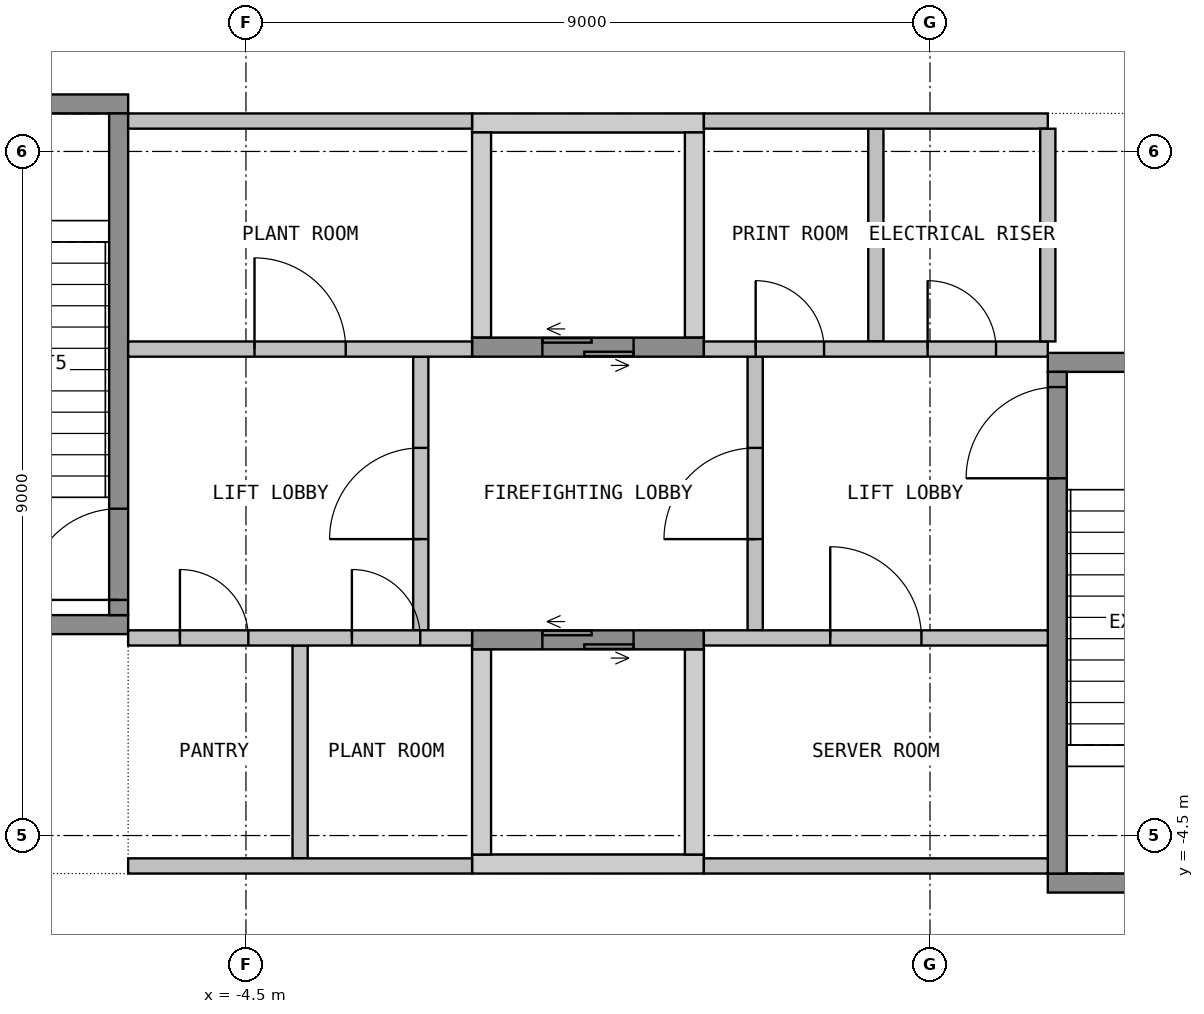
"""IFC4 building model, lengths in metres.
Left out: names, types, materials, properties, quantities, classifications, styles, units other than length and angle.
Written with IfcOpenShell. Run it as: python <this file> out.ifc"""

import sys

from ifc_helpers import new_model, si_unit, direction, frame, frame_2d, origin, place, context, subcontext, project, spatial, polyline, rectangle, outline, extrude, element, fill, save


model = new_model("IFC4")
c1 = context("Model", 3, precision=1e-05, world=origin(), true_north=direction((0.0, 1.0)))
c2 = subcontext(c1, "Body", "Model", "MODEL_VIEW")
j1 = project(units=[si_unit("LENGTHUNIT", "METRE"), si_unit("PLANEANGLEUNIT", "RADIAN")], contexts=[c1])
p1 = place(None, origin())
s1 = spatial("IfcSite", under=j1, at=p1, CompositionType="ELEMENT")
p2 = place(p1, origin())
s2 = spatial("IfcBuilding", under=s1, at=p2, CompositionType="ELEMENT")
p3 = place(p2, frame((0.0, 0.0, 318.9)))
s3 = spatial("IfcBuildingStorey", under=s2, at=p3, CompositionType="ELEMENT", Elevation=318.9)
p4 = place(p3, origin())
e1 = element("IfcWall", 1, at=p4, inside=s3, PredefinedType="SHEAR", context=c2, shape_type="SweptSolid", body=[
    extrude(outline(polyline([(-1.525, 4.75), (1.525, 4.75), (1.525, 5.0), (-1.525, 5.0), (-1.525, 4.75)])), origin(), (0.0, 0.0, 1.0), 3.6),
])
p5 = place(p3, origin())
e2 = element("IfcWall", 2, at=p5, inside=s3, PredefinedType="SHEAR", context=c2, shape_type="SweptSolid", body=[
    extrude(outline(polyline([(-1.525, 2.05), (-1.275, 2.05), (-1.275, 4.75), (-1.525, 4.75), (-1.525, 2.05)])), origin(), (0.0, 0.0, 1.0), 3.6),
])
p6 = place(p3, origin())
e3 = element("IfcWall", 3, at=p6, inside=s3, PredefinedType="SHEAR", context=c2, shape_type="SweptSolid", body=[
    extrude(outline(polyline([(1.275, 2.05), (1.525, 2.05), (1.525, 4.75), (1.275, 4.75), (1.275, 2.05)])), origin(), (0.0, 0.0, 1.0), 3.6),
])
p7 = place(p3, frame((-1.525, 1.925, 0.0), z_axis=(0.0, 0.0, 1.0), x_axis=(1.0, 0.0, 0.0)))
e4 = element("IfcWall", 4, at=p7, inside=s3, PredefinedType="SHEAR", context=c2, shape_type="SweptSolid", body=[
    extrude(rectangle(XDim=3.05, YDim=0.25, at=frame_2d((1.525, 0.0))), origin(), (0.0, 0.0, 1.0), 3.6),
])
p8 = place(p7, frame((0.925, 0.0, 0.0)))
e5 = element("IfcOpeningElement", 5, at=p8, cuts=e4, PredefinedType="OPENING", context=c2, shape_type="SweptSolid", body=[
    extrude(rectangle(XDim=1.2, YDim=2.1, at=frame_2d((0.6, 1.05))), frame((0.0, 0.135, 0.0), z_axis=(0.0, -1.0, 0.0), x_axis=(1.0, 0.0, 0.0)), (0.0, 0.0, 1.0), 0.27),
])
p9 = place(p3, origin())
e6 = element("IfcWall", 6, at=p9, inside=s3, PredefinedType="SHEAR", context=c2, shape_type="SweptSolid", body=[
    extrude(outline(polyline([(-1.525, -5.0), (1.525, -5.0), (1.525, -4.75), (-1.525, -4.75), (-1.525, -5.0)])), origin(), (0.0, 0.0, 1.0), 3.6),
])
p10 = place(p3, origin())
e7 = element("IfcWall", 7, at=p10, inside=s3, PredefinedType="SHEAR", context=c2, shape_type="SweptSolid", body=[
    extrude(outline(polyline([(-1.525, -4.75), (-1.275, -4.75), (-1.275, -2.05), (-1.525, -2.05), (-1.525, -4.75)])), origin(), (0.0, 0.0, 1.0), 3.6),
])
p11 = place(p3, origin())
e8 = element("IfcWall", 8, at=p11, inside=s3, PredefinedType="SHEAR", context=c2, shape_type="SweptSolid", body=[
    extrude(outline(polyline([(1.275, -4.75), (1.525, -4.75), (1.525, -2.05), (1.275, -2.05), (1.275, -4.75)])), origin(), (0.0, 0.0, 1.0), 3.6),
])
p12 = place(p3, frame((-1.525, -1.925, 0.0), z_axis=(0.0, 0.0, 1.0), x_axis=(1.0, 0.0, 0.0)))
e9 = element("IfcWall", 9, at=p12, inside=s3, PredefinedType="SHEAR", context=c2, shape_type="SweptSolid", body=[
    extrude(rectangle(XDim=3.05, YDim=0.25, at=frame_2d((1.525, 0.0))), origin(), (0.0, 0.0, 1.0), 3.6),
])
p13 = place(p12, frame((0.925, 0.0, 0.0)))
e10 = element("IfcOpeningElement", 10, at=p13, cuts=e9, PredefinedType="OPENING", context=c2, shape_type="SweptSolid", body=[
    extrude(rectangle(XDim=1.2, YDim=2.1, at=frame_2d((0.6, 1.05))), frame((0.0, 0.135, 0.0), z_axis=(0.0, -1.0, 0.0), x_axis=(1.0, 0.0, 0.0)), (0.0, 0.0, 1.0), 0.27),
])
p14 = place(p3, frame((-2.2, -1.8, 0.0), z_axis=(0.0, 0.0, 1.0), x_axis=(0.0, 1.0, 0.0)))
e11 = element("IfcWall", 11, at=p14, inside=s3, PredefinedType="PARTITIONING", context=c2, shape_type="SweptSolid", body=[
    extrude(rectangle(XDim=3.6, YDim=0.2, at=frame_2d((1.8, 0.0))), origin(), (0.0, 0.0, 1.0), 3.6),
])
p15 = place(p14, frame((1.2, 0.0, 0.0)))
e12 = element("IfcOpeningElement", 12, at=p15, cuts=e11, PredefinedType="OPENING", context=c2, shape_type="SweptSolid", body=[
    extrude(rectangle(XDim=1.2, YDim=2.1, at=frame_2d((0.6, 1.05))), frame((0.0, 0.11, 0.0), z_axis=(0.0, -1.0, 0.0), x_axis=(1.0, 0.0, 0.0)), (0.0, 0.0, 1.0), 0.22),
])
p16 = place(p3, frame((2.2, -1.8, 0.0), z_axis=(0.0, 0.0, 1.0), x_axis=(0.0, 1.0, 0.0)))
e13 = element("IfcWall", 13, at=p16, inside=s3, PredefinedType="PARTITIONING", context=c2, shape_type="SweptSolid", body=[
    extrude(rectangle(XDim=3.6, YDim=0.2, at=frame_2d((1.8, 0.0))), origin(), (0.0, 0.0, 1.0), 3.6),
])
p17 = place(p16, frame((1.2, 0.0, 0.0)))
e14 = element("IfcOpeningElement", 14, at=p17, cuts=e13, PredefinedType="OPENING", context=c2, shape_type="SweptSolid", body=[
    extrude(rectangle(XDim=1.2, YDim=2.1, at=frame_2d((0.6, 1.05))), frame((0.0, 0.11, 0.0), z_axis=(0.0, -1.0, 0.0), x_axis=(1.0, 0.0, 0.0)), (0.0, 0.0, 1.0), 0.22),
])
for number, where, z_axis, x_axis in (
    (15, (-9.8, -1.725, 0.0), (0.0, 0.0, 1.0), (1.0, 0.0, 0.0)),
    (16, (-9.8, 5.125, 0.0), (0.0, 0.0, 1.0), (1.0, 0.0, 0.0)),
):
    element("IfcWall", number, at=place(p3, frame(where, z_axis=z_axis, x_axis=x_axis)), inside=s3, PredefinedType="SHEAR", context=c2, shape_type="SweptSolid", body=[
        extrude(rectangle(XDim=3.75, YDim=0.25, at=frame_2d((1.875, 0.0))), origin(), (0.0, 0.0, 1.0), 3.6),
    ])
p18 = place(p3, frame((-6.175, -1.6, 0.0), z_axis=(0.0, 0.0, 1.0), x_axis=(0.0, 1.0, 0.0)))
e17 = element("IfcWall", 17, at=p18, inside=s3, PredefinedType="SHEAR", context=c2, shape_type="SweptSolid", body=[
    extrude(rectangle(XDim=6.6, YDim=0.25, at=frame_2d((3.3, 0.0))), origin(), (0.0, 0.0, 1.0), 3.6),
])
p19 = place(p18, frame((0.2, 0.0, 0.0)))
e18 = element("IfcOpeningElement", 18, at=p19, cuts=e17, PredefinedType="OPENING", context=c2, shape_type="SweptSolid", body=[
    extrude(rectangle(XDim=1.2, YDim=2.1, at=frame_2d((0.6, 1.05))), frame((0.0, 0.135, 0.0), z_axis=(0.0, -1.0, 0.0), x_axis=(1.0, 0.0, 0.0)), (0.0, 0.0, 1.0), 0.27),
])
for number, where, z_axis, x_axis in (
    (19, (6.05, -5.125, 0.0), (0.0, 0.0, 1.0), (1.0, 0.0, 0.0)),
    (20, (6.05, 1.725, 0.0), (0.0, 0.0, 1.0), (1.0, 0.0, 0.0)),
):
    element("IfcWall", number, at=place(p3, frame(where, z_axis=z_axis, x_axis=x_axis)), inside=s3, PredefinedType="SHEAR", context=c2, shape_type="SweptSolid", body=[
        extrude(rectangle(XDim=3.75, YDim=0.25, at=frame_2d((1.875, 0.0))), origin(), (0.0, 0.0, 1.0), 3.6),
    ])
p20 = place(p3, frame((6.175, -5.0, 0.0), z_axis=(0.0, 0.0, 1.0), x_axis=(0.0, 1.0, 0.0)))
e21 = element("IfcWall", 21, at=p20, inside=s3, PredefinedType="SHEAR", context=c2, shape_type="SweptSolid", body=[
    extrude(rectangle(XDim=6.6, YDim=0.25, at=frame_2d((3.3, 0.0))), origin(), (0.0, 0.0, 1.0), 3.6),
])
p21 = place(p20, frame((5.2, 0.0, 0.0)))
e22 = element("IfcOpeningElement", 22, at=p21, cuts=e21, PredefinedType="OPENING", context=c2, shape_type="SweptSolid", body=[
    extrude(rectangle(XDim=1.2, YDim=2.1, at=frame_2d((0.6, 1.05))), frame((0.0, 0.135, 0.0), z_axis=(0.0, -1.0, 0.0), x_axis=(1.0, 0.0, 0.0)), (0.0, 0.0, 1.0), 0.27),
])
p22 = place(p3, frame((-6.05, 1.9, 0.0), z_axis=(0.0, 0.0, 1.0), x_axis=(1.0, 0.0, 0.0)))
e23 = element("IfcWall", 23, at=p22, inside=s3, PredefinedType="PARTITIONING", context=c2, shape_type="SweptSolid", body=[
    extrude(rectangle(XDim=4.525, YDim=0.2, at=frame_2d((2.263, 0.0))), origin(), (0.0, 0.0, 1.0), 3.6),
])
p23 = place(p22, frame((1.663, 0.0, 0.0)))
e24 = element("IfcOpeningElement", 24, at=p23, cuts=e23, PredefinedType="OPENING", context=c2, shape_type="SweptSolid", body=[
    extrude(rectangle(XDim=1.2, YDim=2.1, at=frame_2d((0.6, 1.05))), frame((0.0, 0.11, 0.0), z_axis=(0.0, -1.0, 0.0), x_axis=(1.0, 0.0, 0.0)), (0.0, 0.0, 1.0), 0.22),
])
p24 = place(p3, frame((-6.05, 4.9, 0.0), z_axis=(0.0, 0.0, 1.0), x_axis=(1.0, 0.0, 0.0)))
e25 = element("IfcWall", 25, at=p24, inside=s3, PredefinedType="PARTITIONING", context=c2, shape_type="SweptSolid", body=[
    extrude(rectangle(XDim=4.525, YDim=0.2, at=frame_2d((2.263, 0.0))), origin(), (0.0, 0.0, 1.0), 3.6),
])
p25 = place(p3, frame((3.788, 2.0, 0.0), z_axis=(0.0, 0.0, 1.0), x_axis=(0.0, 1.0, 0.0)))
e26 = element("IfcWall", 26, at=p25, inside=s3, PredefinedType="PARTITIONING", context=c2, shape_type="SweptSolid", body=[
    extrude(rectangle(XDim=2.8, YDim=0.2, at=frame_2d((1.4, 0.0))), origin(), (0.0, 0.0, 1.0), 3.6),
])
p26 = place(p3, frame((1.525, 1.9, 0.0), z_axis=(0.0, 0.0, 1.0), x_axis=(1.0, 0.0, 0.0)))
e27 = element("IfcWall", 27, at=p26, inside=s3, PredefinedType="PARTITIONING", context=c2, shape_type="SweptSolid", body=[
    extrude(rectangle(XDim=4.525, YDim=0.2, at=frame_2d((2.263, 0.0))), origin(), (0.0, 0.0, 1.0), 3.6),
])
p27 = place(p26, frame((0.681, 0.0, 0.0)))
e28 = element("IfcOpeningElement", 28, at=p27, cuts=e27, PredefinedType="OPENING", context=c2, shape_type="SweptSolid", body=[
    extrude(rectangle(XDim=0.9, YDim=2.1, at=frame_2d((0.45, 1.05))), frame((0.0, 0.11, 0.0), z_axis=(0.0, -1.0, 0.0), x_axis=(1.0, 0.0, 0.0)), (0.0, 0.0, 1.0), 0.22),
])
p28 = place(p26, frame((2.944, 0.0, 0.0)))
e29 = element("IfcOpeningElement", 29, at=p28, cuts=e27, PredefinedType="OPENING", context=c2, shape_type="SweptSolid", body=[
    extrude(rectangle(XDim=0.9, YDim=2.1, at=frame_2d((0.45, 1.05))), frame((0.0, 0.11, 0.0), z_axis=(0.0, -1.0, 0.0), x_axis=(1.0, 0.0, 0.0)), (0.0, 0.0, 1.0), 0.22),
])
p29 = place(p3, frame((1.525, 4.9, 0.0), z_axis=(0.0, 0.0, 1.0), x_axis=(1.0, 0.0, 0.0)))
e30 = element("IfcWall", 30, at=p29, inside=s3, PredefinedType="PARTITIONING", context=c2, shape_type="SweptSolid", body=[
    extrude(rectangle(XDim=4.525, YDim=0.2, at=frame_2d((2.263, 0.0))), origin(), (0.0, 0.0, 1.0), 3.6),
])
p30 = place(p3, frame((-3.788, -4.8, 0.0), z_axis=(0.0, 0.0, 1.0), x_axis=(0.0, 1.0, 0.0)))
e31 = element("IfcWall", 31, at=p30, inside=s3, PredefinedType="PARTITIONING", context=c2, shape_type="SweptSolid", body=[
    extrude(rectangle(XDim=2.8, YDim=0.2, at=frame_2d((1.4, 0.0))), origin(), (0.0, 0.0, 1.0), 3.6),
])
p31 = place(p3, frame((-6.05, -1.9, 0.0), z_axis=(0.0, 0.0, 1.0), x_axis=(1.0, 0.0, 0.0)))
e32 = element("IfcWall", 32, at=p31, inside=s3, PredefinedType="PARTITIONING", context=c2, shape_type="SweptSolid", body=[
    extrude(rectangle(XDim=4.525, YDim=0.2, at=frame_2d((2.263, 0.0))), origin(), (0.0, 0.0, 1.0), 3.6),
])
p32 = place(p31, frame((0.681, 0.0, 0.0)))
e33 = element("IfcOpeningElement", 33, at=p32, cuts=e32, PredefinedType="OPENING", context=c2, shape_type="SweptSolid", body=[
    extrude(rectangle(XDim=0.9, YDim=2.1, at=frame_2d((0.45, 1.05))), frame((0.0, 0.11, 0.0), z_axis=(0.0, -1.0, 0.0), x_axis=(1.0, 0.0, 0.0)), (0.0, 0.0, 1.0), 0.22),
])
p33 = place(p31, frame((2.944, 0.0, 0.0)))
e34 = element("IfcOpeningElement", 34, at=p33, cuts=e32, PredefinedType="OPENING", context=c2, shape_type="SweptSolid", body=[
    extrude(rectangle(XDim=0.9, YDim=2.1, at=frame_2d((0.45, 1.05))), frame((0.0, 0.11, 0.0), z_axis=(0.0, -1.0, 0.0), x_axis=(1.0, 0.0, 0.0)), (0.0, 0.0, 1.0), 0.22),
])
p34 = place(p3, frame((-6.05, -4.9, 0.0), z_axis=(0.0, 0.0, 1.0), x_axis=(1.0, 0.0, 0.0)))
e35 = element("IfcWall", 35, at=p34, inside=s3, PredefinedType="PARTITIONING", context=c2, shape_type="SweptSolid", body=[
    extrude(rectangle(XDim=4.525, YDim=0.2, at=frame_2d((2.263, 0.0))), origin(), (0.0, 0.0, 1.0), 3.6),
])
p35 = place(p3, frame((1.525, -1.9, 0.0), z_axis=(0.0, 0.0, 1.0), x_axis=(1.0, 0.0, 0.0)))
e36 = element("IfcWall", 36, at=p35, inside=s3, PredefinedType="PARTITIONING", context=c2, shape_type="SweptSolid", body=[
    extrude(rectangle(XDim=4.525, YDim=0.2, at=frame_2d((2.263, 0.0))), origin(), (0.0, 0.0, 1.0), 3.6),
])
p36 = place(p35, frame((1.663, 0.0, 0.0)))
e37 = element("IfcOpeningElement", 37, at=p36, cuts=e36, PredefinedType="OPENING", context=c2, shape_type="SweptSolid", body=[
    extrude(rectangle(XDim=1.2, YDim=2.1, at=frame_2d((0.6, 1.05))), frame((0.0, 0.11, 0.0), z_axis=(0.0, -1.0, 0.0), x_axis=(1.0, 0.0, 0.0)), (0.0, 0.0, 1.0), 0.22),
])
p37 = place(p3, frame((1.525, -4.9, 0.0), z_axis=(0.0, 0.0, 1.0), x_axis=(1.0, 0.0, 0.0)))
e38 = element("IfcWall", 38, at=p37, inside=s3, PredefinedType="PARTITIONING", context=c2, shape_type="SweptSolid", body=[
    extrude(rectangle(XDim=4.525, YDim=0.2, at=frame_2d((2.263, 0.0))), origin(), (0.0, 0.0, 1.0), 3.6),
])
p38 = place(p3, frame((6.05, 2.001, 0.0), z_axis=(0.0, 0.0, 1.0), x_axis=(0.0, 1.0, 0.0)))
e39 = element("IfcWall", 39, at=p38, inside=s3, PredefinedType="PARTITIONING", context=c2, shape_type="SweptSolid", body=[
    extrude(rectangle(XDim=2.798, YDim=0.2, at=frame_2d((1.399, 0.0))), origin(), (0.0, 0.0, 1.0), 3.6),
])
p39 = place(p8, origin())
e40 = element("IfcDoor", 40, at=p39, inside=s3, OperationType="DOUBLE_DOOR_SLIDING", PredefinedType="DOOR", context=c2, shape_type="SweptSolid", body=[
    extrude(rectangle(XDim=1.2, YDim=2.1, at=frame_2d((0.6, 1.05))), frame((0.0, 0.025, 0.0), z_axis=(0.0, -1.0, 0.0), x_axis=(1.0, 0.0, 0.0)), (0.0, 0.0, 1.0), 0.05),
])
fill(e5, e40)
p40 = place(p13, origin())
e41 = element("IfcDoor", 41, at=p40, inside=s3, OperationType="DOUBLE_DOOR_SLIDING", PredefinedType="DOOR", context=c2, shape_type="SweptSolid", body=[
    extrude(rectangle(XDim=1.2, YDim=2.1, at=frame_2d((0.6, 1.05))), frame((0.0, 0.025, 0.0), z_axis=(0.0, -1.0, 0.0), x_axis=(1.0, 0.0, 0.0)), (0.0, 0.0, 1.0), 0.05),
])
fill(e10, e41)
p41 = place(p15, origin())
e42 = element("IfcDoor", 42, at=p41, inside=s3, OperationType="SINGLE_SWING_LEFT", PredefinedType="DOOR", context=c2, shape_type="SweptSolid", body=[
    extrude(rectangle(XDim=1.2, YDim=2.1, at=frame_2d((0.6, 1.05))), frame((0.0, 0.025, 0.0), z_axis=(0.0, -1.0, 0.0), x_axis=(1.0, 0.0, 0.0)), (0.0, 0.0, 1.0), 0.05),
])
fill(e12, e42)
p42 = place(p17, origin())
e43 = element("IfcDoor", 43, at=p42, inside=s3, OperationType="SINGLE_SWING_LEFT", PredefinedType="DOOR", context=c2, shape_type="SweptSolid", body=[
    extrude(rectangle(XDim=1.2, YDim=2.1, at=frame_2d((0.6, 1.05))), frame((0.0, 0.025, 0.0), z_axis=(0.0, -1.0, 0.0), x_axis=(1.0, 0.0, 0.0)), (0.0, 0.0, 1.0), 0.05),
])
fill(e14, e43)
p43 = place(p19, origin())
e44 = element("IfcDoor", 44, at=p43, inside=s3, OperationType="SINGLE_SWING_LEFT", PredefinedType="DOOR", context=c2, shape_type="SweptSolid", body=[
    extrude(rectangle(XDim=1.2, YDim=2.1, at=frame_2d((0.6, 1.05))), frame((0.0, 0.025, 0.0), z_axis=(0.0, -1.0, 0.0), x_axis=(1.0, 0.0, 0.0)), (0.0, 0.0, 1.0), 0.05),
])
fill(e18, e44)
p44 = place(p21, origin())
e45 = element("IfcDoor", 45, at=p44, inside=s3, OperationType="SINGLE_SWING_LEFT", PredefinedType="DOOR", context=c2, shape_type="SweptSolid", body=[
    extrude(rectangle(XDim=1.2, YDim=2.1, at=frame_2d((0.6, 1.05))), frame((0.0, 0.025, 0.0), z_axis=(0.0, -1.0, 0.0), x_axis=(1.0, 0.0, 0.0)), (0.0, 0.0, 1.0), 0.05),
])
fill(e22, e45)
p45 = place(p23, origin())
e46 = element("IfcDoor", 46, at=p45, inside=s3, OperationType="SINGLE_SWING_RIGHT", PredefinedType="DOOR", context=c2, shape_type="SweptSolid", body=[
    extrude(rectangle(XDim=1.2, YDim=2.1, at=frame_2d((0.6, 1.05))), frame((0.0, 0.025, 0.0), z_axis=(0.0, -1.0, 0.0), x_axis=(1.0, 0.0, 0.0)), (0.0, 0.0, 1.0), 0.05),
])
fill(e24, e46)
p46 = place(p27, origin())
e47 = element("IfcDoor", 47, at=p46, inside=s3, OperationType="SINGLE_SWING_LEFT", PredefinedType="DOOR", context=c2, shape_type="SweptSolid", body=[
    extrude(rectangle(XDim=0.9, YDim=2.1, at=frame_2d((0.45, 1.05))), frame((0.0, 0.025, 0.0), z_axis=(0.0, -1.0, 0.0), x_axis=(1.0, 0.0, 0.0)), (0.0, 0.0, 1.0), 0.05),
])
fill(e28, e47)
p47 = place(p28, origin())
e48 = element("IfcDoor", 48, at=p47, inside=s3, OperationType="SINGLE_SWING_LEFT", PredefinedType="DOOR", context=c2, shape_type="SweptSolid", body=[
    extrude(rectangle(XDim=0.9, YDim=2.1, at=frame_2d((0.45, 1.05))), frame((0.0, 0.025, 0.0), z_axis=(0.0, -1.0, 0.0), x_axis=(1.0, 0.0, 0.0)), (0.0, 0.0, 1.0), 0.05),
])
fill(e29, e48)
p48 = place(p32, origin())
e49 = element("IfcDoor", 49, at=p48, inside=s3, OperationType="SINGLE_SWING_LEFT", PredefinedType="DOOR", context=c2, shape_type="SweptSolid", body=[
    extrude(rectangle(XDim=0.9, YDim=2.1, at=frame_2d((0.45, 1.05))), frame((0.0, 0.025, 0.0), z_axis=(0.0, -1.0, 0.0), x_axis=(1.0, 0.0, 0.0)), (0.0, 0.0, 1.0), 0.05),
])
fill(e33, e49)
p49 = place(p33, origin())
e50 = element("IfcDoor", 50, at=p49, inside=s3, OperationType="SINGLE_SWING_LEFT", PredefinedType="DOOR", context=c2, shape_type="SweptSolid", body=[
    extrude(rectangle(XDim=0.9, YDim=2.1, at=frame_2d((0.45, 1.05))), frame((0.0, 0.025, 0.0), z_axis=(0.0, -1.0, 0.0), x_axis=(1.0, 0.0, 0.0)), (0.0, 0.0, 1.0), 0.05),
])
fill(e34, e50)
p50 = place(p36, origin())
e51 = element("IfcDoor", 51, at=p50, inside=s3, OperationType="SINGLE_SWING_RIGHT", PredefinedType="DOOR", context=c2, shape_type="SweptSolid", body=[
    extrude(rectangle(XDim=1.2, YDim=2.1, at=frame_2d((0.6, 1.05))), frame((0.0, 0.025, 0.0), z_axis=(0.0, -1.0, 0.0), x_axis=(1.0, 0.0, 0.0)), (0.0, 0.0, 1.0), 0.05),
])
fill(e37, e51)
save(model, sys.argv[1])
